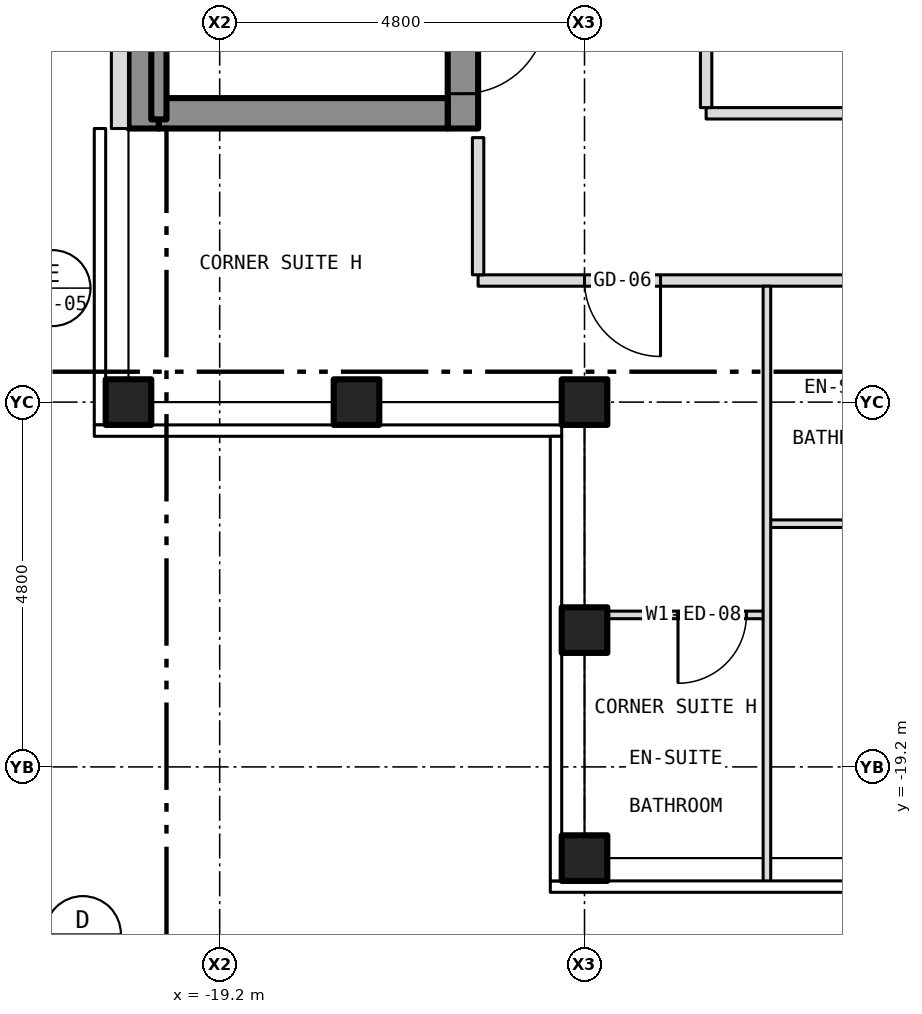
"""IFC4 building model, lengths in metres.
Left out: names, types, materials, properties, quantities, classifications, styles, units other than length and angle.
Written with IfcOpenShell. Run it as: python <this file> out.ifc"""

import sys

from ifc_helpers import new_model, si_unit, direction, frame, frame_2d, origin, origin_2d, place, context, subcontext, project, spatial, rectangle, hollow_rectangle, extrude, element, fill, save


model = new_model("IFC4")
c1 = context("Model", 3, precision=1e-05, world=origin(), true_north=direction((0.0, 1.0)))
c2 = subcontext(c1, "Body", "Model", "MODEL_VIEW")
j1 = project(units=[si_unit("LENGTHUNIT", "METRE"), si_unit("PLANEANGLEUNIT", "RADIAN")], contexts=[c1])
p1 = place(None, origin())
s1 = spatial("IfcSite", under=j1, at=p1, CompositionType="ELEMENT")
p2 = place(p1, origin())
s2 = spatial("IfcBuilding", under=s1, at=p2, CompositionType="ELEMENT")
p3 = place(p2, frame((0.0, 0.0, 262.0)))
s3 = spatial("IfcBuildingStorey", under=s2, at=p3, CompositionType="ELEMENT", Elevation=262.0)
for number, where, z_axis, x_axis in (
    (1, (-14.4, -20.4, -0.15), (0.0, 0.0, 1.0), (1.0, 0.0, 0.0)),
    (2, (-20.4, -14.4, -0.15), (0.0, 0.0, 1.0), (1.0, 0.0, 0.0)),
    (3, (-14.4, -14.4, -0.15), (0.0, 0.0, 1.0), (1.0, 0.0, 0.0)),
    (4, (-14.4, -17.4, -0.15), (0.0, 0.0, 1.0), (1.0, 0.0, 0.0)),
    (5, (-17.4, -14.4, -0.15), (0.0, 0.0, 1.0), (1.0, 0.0, 0.0)),
):
    element("IfcColumn", number, at=place(p3, frame(where, z_axis=z_axis, x_axis=x_axis)), inside=s3, PredefinedType="COLUMN", context=c2, shape_type="SweptSolid", body=[
        extrude(hollow_rectangle(XDim=0.6, YDim=0.6, WallThickness=0.03, at=origin_2d()), origin(), (0.0, 0.0, 1.0), 3.4),
    ])
p4 = place(p3, frame((-16.0, -10.8, 0.0), z_axis=(0.0, 0.0, 1.0), x_axis=(0.0, 1.0, 0.0)))
e6 = element("IfcWall", 6, at=p4, inside=s3, PredefinedType="SHEAR", context=c2, shape_type="SweptSolid", body=[
    extrude(rectangle(XDim=21.6, YDim=0.4, at=frame_2d((10.8, 0.0))), origin(), (0.0, 0.0, 1.0), 3.25),
])
p5 = place(p4, frame((9.4, 0.0, 0.0)))
e7 = element("IfcOpeningElement", 7, at=p5, cuts=e6, PredefinedType="OPENING", context=c2, shape_type="SweptSolid", body=[
    extrude(rectangle(XDim=1.1, YDim=2.1, at=frame_2d((0.55, 1.05))), frame((0.0, 0.212, 0.0), z_axis=(0.0, -1.0, 0.0), x_axis=(1.0, 0.0, 0.0)), (0.0, 0.0, 1.0), 0.424),
])
p6 = place(p4, frame((11.5, 0.0, 0.0)))
e8 = element("IfcOpeningElement", 8, at=p6, cuts=e6, PredefinedType="OPENING", context=c2, shape_type="SweptSolid", body=[
    extrude(rectangle(XDim=1.1, YDim=2.1, at=frame_2d((0.55, 1.05))), frame((0.0, 0.212, 0.0), z_axis=(0.0, -1.0, 0.0), x_axis=(1.0, 0.0, 0.0)), (0.0, 0.0, 1.0), 0.424),
])
p7 = place(p4, frame((13.6, 0.0, 0.0)))
e9 = element("IfcOpeningElement", 9, at=p7, cuts=e6, PredefinedType="OPENING", context=c2, shape_type="SweptSolid", body=[
    extrude(rectangle(XDim=1.1, YDim=2.1, at=frame_2d((0.55, 1.05))), frame((0.0, 0.212, 0.0), z_axis=(0.0, -1.0, 0.0), x_axis=(1.0, 0.0, 0.0)), (0.0, 0.0, 1.0), 0.424),
])
p8 = place(p4, frame((15.7, 0.0, 0.0)))
e10 = element("IfcOpeningElement", 10, at=p8, cuts=e6, PredefinedType="OPENING", context=c2, shape_type="SweptSolid", body=[
    extrude(rectangle(XDim=1.1, YDim=2.1, at=frame_2d((0.55, 1.05))), frame((0.0, 0.212, 0.0), z_axis=(0.0, -1.0, 0.0), x_axis=(1.0, 0.0, 0.0)), (0.0, 0.0, 1.0), 0.424),
])
p9 = place(p4, frame((17.8, 0.0, 0.0)))
e11 = element("IfcOpeningElement", 11, at=p9, cuts=e6, PredefinedType="OPENING", context=c2, shape_type="SweptSolid", body=[
    extrude(rectangle(XDim=1.1, YDim=2.1, at=frame_2d((0.55, 1.05))), frame((0.0, 0.212, 0.0), z_axis=(0.0, -1.0, 0.0), x_axis=(1.0, 0.0, 0.0)), (0.0, 0.0, 1.0), 0.424),
])
p10 = place(p4, frame((0.458, 0.0, 0.0)))
e12 = element("IfcOpeningElement", 12, at=p10, cuts=e6, PredefinedType="OPENING", context=c2, shape_type="SweptSolid", body=[
    extrude(rectangle(XDim=1.1, YDim=2.1, at=frame_2d((0.55, 1.05))), frame((0.0, 0.212, 0.0), z_axis=(0.0, -1.0, 0.0), x_axis=(1.0, 0.0, 0.0)), (0.0, 0.0, 1.0), 0.424),
])
p11 = place(p4, frame((7.5, 0.0, 0.0)))
e13 = element("IfcOpeningElement", 13, at=p11, cuts=e6, PredefinedType="OPENING", context=c2, shape_type="SweptSolid", body=[
    extrude(rectangle(XDim=1.1, YDim=2.1, at=frame_2d((0.55, 1.05))), frame((0.0, 0.212, 0.0), z_axis=(0.0, -1.0, 0.0), x_axis=(1.0, 0.0, 0.0)), (0.0, 0.0, 1.0), 0.424),
])
p12 = place(p4, frame((20.0, 0.0, 0.0)))
e14 = element("IfcOpeningElement", 14, at=p12, cuts=e6, PredefinedType="OPENING", context=c2, shape_type="SweptSolid", body=[
    extrude(rectangle(XDim=0.9, YDim=2.1, at=frame_2d((0.45, 1.05))), frame((0.0, 0.212, 0.0), z_axis=(0.0, -1.0, 0.0), x_axis=(1.0, 0.0, 0.0)), (0.0, 0.0, 1.0), 0.424),
])
p13 = place(p3, frame((-20.2, -10.8, 0.0), z_axis=(0.0, 0.0, 1.0), x_axis=(0.0, 1.0, 0.0)))
e15 = element("IfcWall", 15, at=p13, inside=s3, PredefinedType="SHEAR", context=c2, shape_type="SweptSolid", body=[
    extrude(rectangle(XDim=21.6, YDim=0.4, at=frame_2d((10.8, 0.0))), origin(), (0.0, 0.0, 1.0), 3.25),
])
p14 = place(p3, frame((-20.0, -10.6, 0.0), z_axis=(0.0, 0.0, 1.0), x_axis=(1.0, 0.0, 0.0)))
e16 = element("IfcWall", 16, at=p14, inside=s3, PredefinedType="SHEAR", context=c2, shape_type="SweptSolid", body=[
    extrude(rectangle(XDim=3.8, YDim=0.4, at=frame_2d((1.9, 0.0))), origin(), (0.0, 0.0, 1.0), 3.25),
])
p15 = place(p3, frame((-20.512, 10.8, 0.0), z_axis=(0.0, 0.0, 1.0), x_axis=(0.0, -1.0, 0.0)))
e17 = element("IfcWall", 17, at=p15, inside=s3, PredefinedType="SOLIDWALL", context=c2, shape_type="SweptSolid", body=[
    extrude(rectangle(XDim=21.6, YDim=0.225, at=frame_2d((10.8, 0.0))), origin(), (0.0, 0.0, 1.0), 3.5),
])
p16 = place(p15, frame((18.05, 0.0, 1.0)))
e18 = element("IfcOpeningElement", 18, at=p16, cuts=e17, PredefinedType="OPENING", context=c2, shape_type="SweptSolid", body=[
    extrude(rectangle(XDim=0.6, YDim=1.5, at=frame_2d((0.3, 0.75))), frame((0.0, 0.125, 0.0), z_axis=(0.0, -1.0, 0.0), x_axis=(1.0, 0.0, 0.0)), (0.0, 0.0, 1.0), 0.249),
])
p17 = place(p3, frame((-14.28, -17.2, 0.0), z_axis=(0.0, 0.0, 1.0), x_axis=(1.0, 0.0, 0.0)))
e19 = element("IfcWall", 19, at=p17, inside=s3, PredefinedType="PARTITIONING", context=c2, shape_type="SweptSolid", body=[
    extrude(rectangle(XDim=2.28, YDim=0.1, at=frame_2d((1.14, 0.0))), origin(), (0.0, 0.0, 1.0), 3.25),
])
p18 = place(p17, frame((1.11, 0.0, 0.0)))
e20 = element("IfcOpeningElement", 20, at=p18, cuts=e19, PredefinedType="OPENING", context=c2, shape_type="SweptSolid", body=[
    extrude(rectangle(XDim=0.9, YDim=2.1, at=frame_2d((0.45, 1.05))), frame((0.0, 0.062, 0.0), z_axis=(0.0, -1.0, 0.0), x_axis=(1.0, 0.0, 0.0)), (0.0, 0.0, 1.0), 0.124),
])
p19 = place(p3, frame((-12.0, -16.0, 0.0), z_axis=(0.0, 0.0, 1.0), x_axis=(1.0, 0.0, 0.0)))
e21 = element("IfcWall", 21, at=p19, inside=s3, PredefinedType="PARTITIONING", context=c2, shape_type="SweptSolid", body=[
    extrude(rectangle(XDim=2.2, YDim=0.1, at=frame_2d((1.1, 0.0))), origin(), (0.0, 0.0, 1.0), 3.25),
])
p20 = place(p3, frame((-15.8, -12.8, 0.0), z_axis=(0.0, 0.0, 1.0), x_axis=(1.0, 0.0, 0.0)))
e22 = element("IfcWall", 22, at=p20, inside=s3, PredefinedType="PARTITIONING", context=c2, shape_type="SweptSolid", body=[
    extrude(rectangle(XDim=31.6, YDim=0.15, at=frame_2d((15.8, 0.0))), origin(), (0.0, 0.0, 1.0), 3.25),
])
p21 = place(p20, frame((6.8, 0.0, 0.0)))
e23 = element("IfcOpeningElement", 23, at=p21, cuts=e22, PredefinedType="OPENING", context=c2, shape_type="SweptSolid", body=[
    extrude(rectangle(XDim=1.0, YDim=2.1, at=frame_2d((0.5, 1.05))), frame((0.0, 0.087, 0.0), z_axis=(0.0, -1.0, 0.0), x_axis=(1.0, 0.0, 0.0)), (0.0, 0.0, 1.0), 0.174),
])
p22 = place(p20, frame((15.35, 0.0, 0.0)))
e24 = element("IfcOpeningElement", 24, at=p22, cuts=e22, PredefinedType="OPENING", context=c2, shape_type="SweptSolid", body=[
    extrude(rectangle(XDim=0.9, YDim=2.1, at=frame_2d((0.45, 1.05))), frame((0.0, 0.087, 0.0), z_axis=(0.0, -1.0, 0.0), x_axis=(1.0, 0.0, 0.0)), (0.0, 0.0, 1.0), 0.174),
])
p23 = place(p20, frame((24.95, 0.0, 0.0)))
e25 = element("IfcOpeningElement", 25, at=p23, cuts=e22, PredefinedType="OPENING", context=c2, shape_type="SweptSolid", body=[
    extrude(rectangle(XDim=0.9, YDim=2.1, at=frame_2d((0.45, 1.05))), frame((0.0, 0.087, 0.0), z_axis=(0.0, -1.0, 0.0), x_axis=(1.0, 0.0, 0.0)), (0.0, 0.0, 1.0), 0.174),
])
p24 = place(p20, frame((1.4, 0.0, 0.0)))
e26 = element("IfcOpeningElement", 26, at=p24, cuts=e22, PredefinedType="OPENING", context=c2, shape_type="SweptSolid", body=[
    extrude(rectangle(XDim=1.0, YDim=2.1, at=frame_2d((0.5, 1.05))), frame((0.0, 0.087, 0.0), z_axis=(0.0, -1.0, 0.0), x_axis=(1.0, 0.0, 0.0)), (0.0, 0.0, 1.0), 0.174),
])
p25 = place(p20, frame((29.2, 0.0, 0.0)))
e27 = element("IfcOpeningElement", 27, at=p25, cuts=e22, PredefinedType="OPENING", context=c2, shape_type="SweptSolid", body=[
    extrude(rectangle(XDim=1.0, YDim=2.1, at=frame_2d((0.5, 1.05))), frame((0.0, 0.087, 0.0), z_axis=(0.0, -1.0, 0.0), x_axis=(1.0, 0.0, 0.0)), (0.0, 0.0, 1.0), 0.174),
])
p26 = place(p3, frame((-12.8, -10.6, 0.0), z_axis=(0.0, 0.0, 1.0), x_axis=(1.0, 0.0, 0.0)))
e28 = element("IfcWall", 28, at=p26, inside=s3, PredefinedType="PARTITIONING", context=c2, shape_type="SweptSolid", body=[
    extrude(rectangle(XDim=18.7, YDim=0.15, at=frame_2d((9.35, 0.0))), origin(), (0.0, 0.0, 1.0), 3.25),
])
p27 = place(p26, frame((8.9, 0.0, 0.0)))
e29 = element("IfcOpeningElement", 29, at=p27, cuts=e28, PredefinedType="OPENING", context=c2, shape_type="SweptSolid", body=[
    extrude(rectangle(XDim=0.9, YDim=2.1, at=frame_2d((0.45, 1.05))), frame((0.0, 0.087, 0.0), z_axis=(0.0, -1.0, 0.0), x_axis=(1.0, 0.0, 0.0)), (0.0, 0.0, 1.0), 0.174),
])
p28 = place(p3, frame((-20.0, -10.68, 0.0), z_axis=(0.0, 0.0, 1.0), x_axis=(0.0, 1.0, 0.0)))
e30 = element("IfcWall", 30, at=p28, inside=s3, PredefinedType="SHEAR", context=c2, shape_type="SweptSolid", body=[
    extrude(rectangle(XDim=6.98, YDim=0.2, at=frame_2d((3.49, 0.0))), origin(), (0.0, 0.0, 1.0), 3.25),
])
p29 = place(p3, frame((-15.8, -12.725, 0.0), z_axis=(0.0, 0.0, 1.0), x_axis=(0.0, 1.0, 0.0)))
e31 = element("IfcWall", 31, at=p29, inside=s3, PredefinedType="PARTITIONING", context=c2, shape_type="SweptSolid", body=[
    extrude(rectangle(XDim=1.805, YDim=0.15, at=frame_2d((0.903, 0.0))), origin(), (0.0, 0.0, 1.0), 3.25),
])
p30 = place(p3, frame((-12.8, -10.525, 0.0), z_axis=(0.0, 0.0, 1.0), x_axis=(0.0, 1.0, 0.0)))
e32 = element("IfcWall", 32, at=p30, inside=s3, PredefinedType="PARTITIONING", context=c2, shape_type="SweptSolid", body=[
    extrude(rectangle(XDim=8.525, YDim=0.15, at=frame_2d((4.262, 0.0))), origin(), (0.0, 0.0, 1.0), 3.25),
])
p31 = place(p3, frame((-12.0, -20.73, 0.0), z_axis=(0.0, 0.0, 1.0), x_axis=(0.0, 1.0, 0.0)))
e33 = element("IfcWall", 33, at=p31, inside=s3, PredefinedType="PARTITIONING", context=c2, shape_type="SweptSolid", body=[
    extrude(rectangle(XDim=7.855, YDim=0.1, at=frame_2d((3.927, 0.0))), origin(), (0.0, 0.0, 1.0), 3.25),
])
p32 = place(p10, origin())
e34 = element("IfcDoor", 34, at=p32, inside=s3, OperationType="SINGLE_SWING_RIGHT", PredefinedType="DOOR", context=c2, shape_type="SweptSolid", body=[
    extrude(rectangle(XDim=1.1, YDim=2.1, at=frame_2d((0.55, 1.05))), frame((0.0, 0.025, 0.0), z_axis=(0.0, -1.0, 0.0), x_axis=(1.0, 0.0, 0.0)), (0.0, 0.0, 1.0), 0.05),
])
fill(e12, e34)
p33 = place(p18, origin())
e35 = element("IfcDoor", 35, at=p33, inside=s3, OperationType="SINGLE_SWING_LEFT", PredefinedType="DOOR", context=c2, shape_type="SweptSolid", body=[
    extrude(rectangle(XDim=0.9, YDim=2.1, at=frame_2d((0.45, 1.05))), frame((0.0, 0.025, 0.0), z_axis=(0.0, -1.0, 0.0), x_axis=(1.0, 0.0, 0.0)), (0.0, 0.0, 1.0), 0.05),
])
fill(e20, e35)
p34 = place(p24, origin())
e36 = element("IfcDoor", 36, at=p34, inside=s3, OperationType="SINGLE_SWING_RIGHT", PredefinedType="DOOR", context=c2, shape_type="SweptSolid", body=[
    extrude(rectangle(XDim=1.0, YDim=2.1, at=frame_2d((0.5, 1.05))), frame((0.0, 0.025, 0.0), z_axis=(0.0, -1.0, 0.0), x_axis=(1.0, 0.0, 0.0)), (0.0, 0.0, 1.0), 0.05),
])
fill(e26, e36)
save(model, sys.argv[1])
